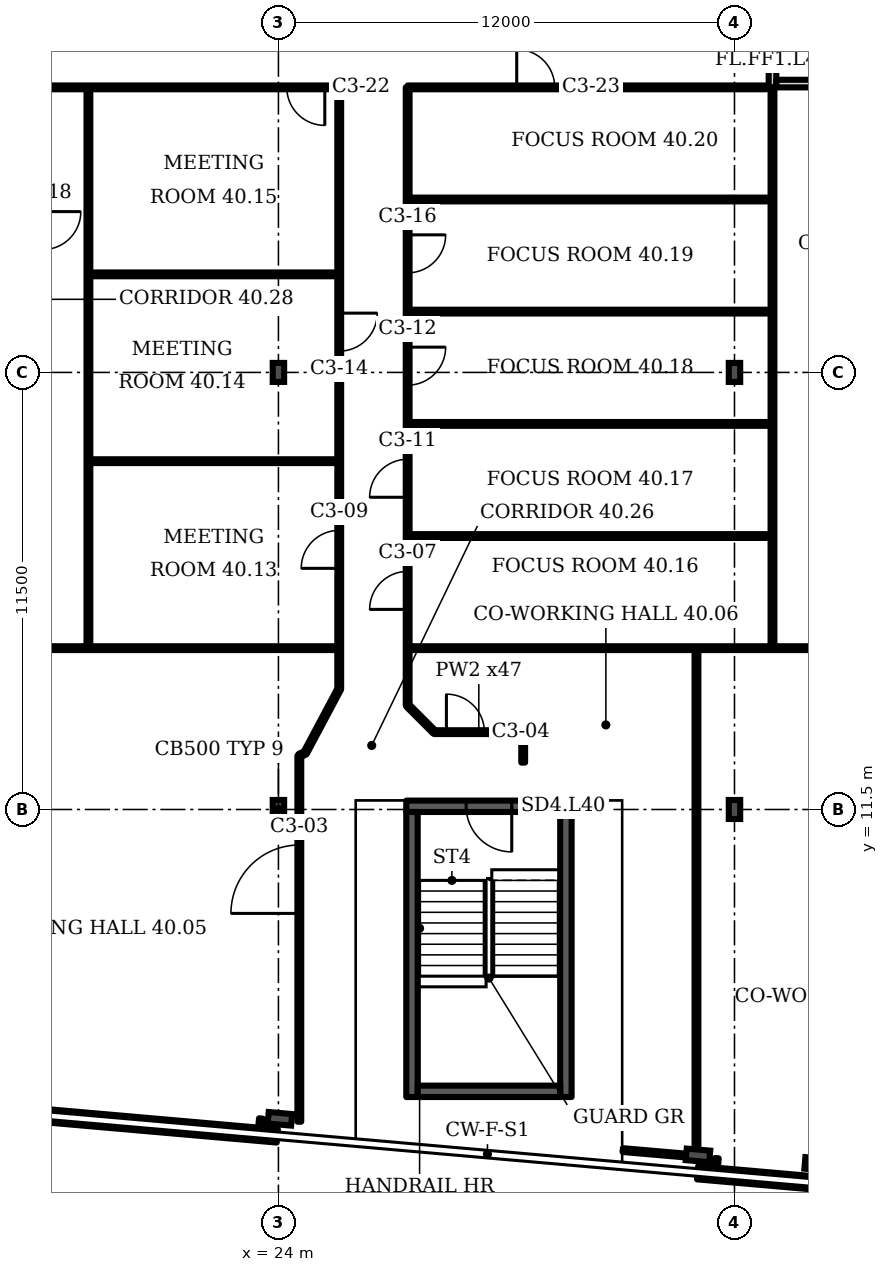
"""IFC4 building model, lengths in metres.
Left out: names, types, materials, properties, quantities, classifications, styles, units other than length and angle.
Written with IfcOpenShell. Run it as: python <this file> out.ifc"""

import sys

from ifc_helpers import new_model, si_unit, direction, frame, frame_2d, origin, origin_2d, place, context, subcontext, project, spatial, rectangle, i_section, extrude, element, fill, save


model = new_model("IFC4")
c1 = context("Model", 3, precision=1e-05, world=origin(), true_north=direction((0.0, 1.0)))
c2 = subcontext(c1, "Body", "Model", "MODEL_VIEW")
j1 = project(units=[si_unit("LENGTHUNIT", "METRE"), si_unit("PLANEANGLEUNIT", "RADIAN")], contexts=[c1])
p1 = place(None, origin())
s1 = spatial("IfcSite", under=j1, at=p1, CompositionType="ELEMENT")
p2 = place(p1, origin())
s2 = spatial("IfcBuilding", under=s1, at=p2, CompositionType="ELEMENT")
p3 = place(p2, frame((0.0, 0.0, 166.3)))
s3 = spatial("IfcBuildingStorey", under=s2, at=p3, CompositionType="ELEMENT", Elevation=166.3)
for number, where, z_axis, x_axis in (
    (1, (24.039, 3.361, 0.0), (0.0, 0.0, 1.0), (-0.087, -0.996, 0.0)),
    (2, (35.039, 2.399, 0.0), (0.0, 0.0, 1.0), (-0.087, -0.996, 0.0)),
    (3, (38.161, 2.174, 0.0), (0.0, 0.0, 1.0), (-0.087, -0.996, 0.0)),
):
    element("IfcColumn", number, at=place(p3, frame(where, z_axis=z_axis, x_axis=x_axis)), inside=s3, PredefinedType="COLUMN", context=c2, shape_type="SweptSolid", body=[
        extrude(i_section(OverallWidth=0.305, OverallDepth=0.62, WebThickness=0.021, FlangeThickness=0.04, FilletRadius=0.027, at=origin_2d()), origin(), (0.0, 0.0, 1.0), 3.6),
    ])
for number, where, z_axis, x_axis in (
    (4, (24.0, 11.5, 0.0), (0.0, 0.0, 1.0), (1.0, 0.0, 0.0)),
    (5, (36.0, 11.5, 0.0), (0.0, 0.0, 1.0), (1.0, 0.0, 0.0)),
    (6, (24.0, 23.0, 0.0), (0.0, 0.0, 1.0), (1.0, 0.0, 0.0)),
    (7, (36.0, 23.0, 0.0), (0.0, 0.0, 1.0), (1.0, 0.0, 0.0)),
):
    element("IfcColumn", number, at=place(p3, frame(where, z_axis=z_axis, x_axis=x_axis)), inside=s3, PredefinedType="COLUMN", context=c2, shape_type="SweptSolid", body=[
        extrude(i_section(OverallWidth=0.3, OverallDepth=0.5, WebThickness=0.014, FlangeThickness=0.028, FilletRadius=0.027, at=origin_2d()), origin(), (0.0, 0.0, 1.0), 3.6),
    ])
p4 = place(p3, frame((12.835, 3.885, 0.0), z_axis=(0.0, 0.0, 1.0), x_axis=(0.996199, -0.087154, 0.0)))
e8 = element("IfcWall", 8, at=p4, inside=s3, PredefinedType="SOLIDWALL", context=c2, shape_type="SweptSolid", body=[
    extrude(rectangle(XDim=11.177, YDim=0.35, at=frame_2d((5.588, 0.0))), origin(), (0.0, 0.0, 1.0), 1.0),
])
p5 = place(p3, frame((35.03, 1.943, 0.0), z_axis=(0.0, 0.0, 1.0), x_axis=(0.996199, -0.08714, 0.0)))
e9 = element("IfcWall", 9, at=p5, inside=s3, PredefinedType="SOLIDWALL", context=c2, shape_type="SweptSolid", body=[
    extrude(rectangle(XDim=11.028, YDim=0.35, at=frame_2d((5.514, 0.0))), origin(), (0.0, 0.0, 1.0), 1.0),
])
p6 = place(p3, frame((37.0, 30.5, 0.0), z_axis=(0.0, 0.0, 1.0), x_axis=(0.0, 1.0, 0.0)))
e10 = element("IfcWall", 10, at=p6, inside=s3, PredefinedType="PARTITIONING", context=c2, shape_type="SweptSolid", body=[
    extrude(rectangle(XDim=3.5, YDim=0.2, at=frame_2d((1.75, 0.0))), origin(), (0.0, 0.0, 1.0), 3.2),
])
p7 = place(p6, frame((1.2, 0.0, 0.0)))
e11 = element("IfcOpeningElement", 11, at=p7, cuts=e10, PredefinedType="OPENING", context=c2, shape_type="SweptSolid", body=[
    extrude(rectangle(XDim=1.1, YDim=2.1, at=frame_2d((0.55, 1.05))), frame((0.0, 0.11, 0.0), z_axis=(0.0, -1.0, 0.0), x_axis=(1.0, 0.0, 0.0)), (0.0, 0.0, 1.0), 0.22),
])
p8 = place(p3, frame((37.1, 30.6, 0.0), z_axis=(0.0, 0.0, 1.0), x_axis=(1.0, 0.0, 0.0)))
e12 = element("IfcWall", 12, at=p8, inside=s3, PredefinedType="PARTITIONING", context=c2, shape_type="SweptSolid", body=[
    extrude(rectangle(XDim=2.8, YDim=0.2, at=frame_2d((1.4, 0.0))), origin(), (0.0, 0.0, 1.0), 3.2),
])
p9 = place(p3, frame((27.364, 11.584, 0.0), z_axis=(0.0, 0.0, 1.0), x_axis=(1.0, 0.0, 0.0)))
e13 = element("IfcWall", 13, at=p9, inside=s3, PredefinedType="SHEAR", context=c2, shape_type="SweptSolid", body=[
    extrude(rectangle(XDim=4.35, YDim=0.3, at=frame_2d((2.175, 0.0))), origin(), (0.0, 0.0, 1.0), 3.2),
])
p10 = place(p9, frame((1.575, 0.0, 0.0)))
e14 = element("IfcOpeningElement", 14, at=p10, cuts=e13, PredefinedType="OPENING", context=c2, shape_type="SweptSolid", body=[
    extrude(rectangle(XDim=1.2, YDim=2.1, at=frame_2d((0.6, 1.05))), frame((0.0, 0.16, 0.0), z_axis=(0.0, -1.0, 0.0), x_axis=(1.0, 0.0, 0.0)), (0.0, 0.0, 1.0), 0.32),
])
p11 = place(p3, frame((13.0, 15.745, 0.0), z_axis=(0.0, 0.0, 1.0), x_axis=(1.0, 0.0, 0.0)))
e15 = element("IfcWall", 15, at=p11, inside=s3, PredefinedType="PARTITIONING", context=c2, shape_type="SweptSolid", body=[
    extrude(rectangle(XDim=12.6, YDim=0.1, at=frame_2d((6.3, 0.0))), origin(), (0.0, 0.0, 1.0), 3.2),
])
p12 = place(p3, frame((17.8, 30.5, 0.0), z_axis=(0.0, 0.0, 1.0), x_axis=(1.0, 0.0, 0.0)))
e16 = element("IfcWall", 16, at=p12, inside=s3, PredefinedType="PARTITIONING", context=c2, shape_type="SweptSolid", body=[
    extrude(rectangle(XDim=7.8, YDim=0.1, at=frame_2d((3.9, 0.0))), origin(), (0.0, 0.0, 1.0), 3.2),
])
p13 = place(p12, frame((6.42, 0.0, 0.0)))
e17 = element("IfcOpeningElement", 17, at=p13, cuts=e16, PredefinedType="OPENING", context=c2, shape_type="SweptSolid", body=[
    extrude(rectangle(XDim=1.0, YDim=2.1, at=frame_2d((0.5, 1.05))), frame((0.0, 0.06, 0.0), z_axis=(0.0, -1.0, 0.0), x_axis=(1.0, 0.0, 0.0)), (0.0, 0.0, 1.0), 0.12),
])
p14 = place(p3, frame((19.0, 15.745, 0.0), z_axis=(0.0, 0.0, 1.0), x_axis=(0.0, 1.0, 0.0)))
e18 = element("IfcWall", 18, at=p14, inside=s3, PredefinedType="PARTITIONING", context=c2, shape_type="SweptSolid", body=[
    extrude(rectangle(XDim=14.755, YDim=0.1, at=frame_2d((7.377, 0.0))), origin(), (0.0, 0.0, 1.0), 3.2),
])
for number, where, z_axis, x_axis in (
    (19, (19.0, 20.665, 0.0), (0.0, 0.0, 1.0), (1.0, 0.0, 0.0)),
    (20, (19.0, 25.58, 0.0), (0.0, 0.0, 1.0), (1.0, 0.0, 0.0)),
):
    element("IfcWall", number, at=place(p3, frame(where, z_axis=z_axis, x_axis=x_axis)), inside=s3, PredefinedType="PARTITIONING", context=c2, shape_type="SweptSolid", body=[
        extrude(rectangle(XDim=6.6, YDim=0.1, at=frame_2d((3.3, 0.0))), origin(), (0.0, 0.0, 1.0), 3.2),
    ])
p15 = place(p3, frame((23.502, 2.976, 0.0), z_axis=(0.0, 0.0, 1.0), x_axis=(0.095654, 0.995419, 0.0)))
e21 = element("IfcWall", 21, at=p15, inside=s3, PredefinedType="PARTITIONING", context=c2, shape_type="SweptSolid", body=[
    extrude(rectangle(XDim=0.396, YDim=0.1, at=frame_2d((0.198, 0.0))), origin(), (0.0, 0.0, 1.0), 3.2),
])
p16 = place(p3, frame((24.55, 12.915, 0.0), z_axis=(0.0, 0.0, 1.0), x_axis=(0.900306, 0.435266, 0.0)))
e22 = element("IfcWall", 22, at=p16, inside=s3, PredefinedType="PARTITIONING", context=c2, shape_type="SweptSolid", body=[
    extrude(rectangle(XDim=0.172, YDim=0.1, at=frame_2d((0.086, 0.0))), origin(), (0.0, 0.0, 1.0), 3.2),
])
p17 = place(p3, frame((24.55, 3.285, 0.0), z_axis=(0.0, 0.0, 1.0), x_axis=(0.0, 1.0, 0.0)))
e23 = element("IfcWall", 23, at=p17, inside=s3, PredefinedType="PARTITIONING", context=c2, shape_type="SweptSolid", body=[
    extrude(rectangle(XDim=9.63, YDim=0.1, at=frame_2d((4.815, 0.0))), origin(), (0.0, 0.0, 1.0), 3.2),
])
p18 = place(p17, frame((5.481, 0.0, 0.0)))
e24 = element("IfcOpeningElement", 24, at=p18, cuts=e23, PredefinedType="OPENING", context=c2, shape_type="SweptSolid", body=[
    extrude(rectangle(XDim=1.8, YDim=2.1, at=frame_2d((0.9, 1.05))), frame((0.0, 0.06, 0.0), z_axis=(0.0, -1.0, 0.0), x_axis=(1.0, 0.0, 0.0)), (0.0, 0.0, 1.0), 0.12),
])
p19 = place(p3, frame((24.705, 12.99, 0.0), z_axis=(0.0, 0.0, 1.0), x_axis=(0.4702, 0.882555, 0.0)))
e25 = element("IfcWall", 25, at=p19, inside=s3, PredefinedType="PARTITIONING", context=c2, shape_type="SweptSolid", body=[
    extrude(rectangle(XDim=1.904, YDim=0.1, at=frame_2d((0.952, 0.0))), origin(), (0.0, 0.0, 1.0), 3.2),
])
p20 = place(p3, frame((25.6, 14.67, 0.0), z_axis=(0.0, 0.0, 1.0), x_axis=(0.0, 1.0, 0.0)))
e26 = element("IfcWall", 26, at=p20, inside=s3, PredefinedType="PARTITIONING", context=c2, shape_type="SweptSolid", body=[
    extrude(rectangle(XDim=15.83, YDim=0.1, at=frame_2d((7.915, 0.0))), origin(), (0.0, 0.0, 1.0), 3.2),
])
p21 = place(p20, frame((3.175, 0.0, 0.0)))
e27 = element("IfcOpeningElement", 27, at=p21, cuts=e26, PredefinedType="OPENING", context=c2, shape_type="SweptSolid", body=[
    extrude(rectangle(XDim=1.0, YDim=2.1, at=frame_2d((0.5, 1.05))), frame((0.0, 0.06, 0.0), z_axis=(0.0, -1.0, 0.0), x_axis=(1.0, 0.0, 0.0)), (0.0, 0.0, 1.0), 0.12),
])
p22 = place(p20, frame((8.89, 0.0, 0.0)))
e28 = element("IfcOpeningElement", 28, at=p22, cuts=e26, PredefinedType="OPENING", context=c2, shape_type="SweptSolid", body=[
    extrude(rectangle(XDim=1.0, YDim=2.1, at=frame_2d((0.5, 1.05))), frame((0.0, 0.06, 0.0), z_axis=(0.0, -1.0, 0.0), x_axis=(1.0, 0.0, 0.0)), (0.0, 0.0, 1.0), 0.12),
])
p23 = place(p3, frame((27.4, 14.24, 0.0), z_axis=(0.0, 0.0, 1.0), x_axis=(0.0, 1.0, 0.0)))
e29 = element("IfcWall", 29, at=p23, inside=s3, PredefinedType="PARTITIONING", context=c2, shape_type="SweptSolid", body=[
    extrude(rectangle(XDim=16.26, YDim=0.1, at=frame_2d((8.13, 0.0))), origin(), (0.0, 0.0, 1.0), 3.2),
])
p24 = place(p23, frame((2.525, 0.0, 0.0)))
e30 = element("IfcOpeningElement", 30, at=p24, cuts=e29, PredefinedType="OPENING", context=c2, shape_type="SweptSolid", body=[
    extrude(rectangle(XDim=1.0, YDim=2.1, at=frame_2d((0.5, 1.05))), frame((0.0, 0.06, 0.0), z_axis=(0.0, -1.0, 0.0), x_axis=(1.0, 0.0, 0.0)), (0.0, 0.0, 1.0), 0.12),
])
p25 = place(p23, frame((5.475, 0.0, 0.0)))
e31 = element("IfcOpeningElement", 31, at=p25, cuts=e29, PredefinedType="OPENING", context=c2, shape_type="SweptSolid", body=[
    extrude(rectangle(XDim=1.0, YDim=2.1, at=frame_2d((0.5, 1.05))), frame((0.0, 0.06, 0.0), z_axis=(0.0, -1.0, 0.0), x_axis=(1.0, 0.0, 0.0)), (0.0, 0.0, 1.0), 0.12),
])
p26 = place(p23, frame((8.425, 0.0, 0.0)))
e32 = element("IfcOpeningElement", 32, at=p26, cuts=e29, PredefinedType="OPENING", context=c2, shape_type="SweptSolid", body=[
    extrude(rectangle(XDim=1.0, YDim=2.1, at=frame_2d((0.5, 1.05))), frame((0.0, 0.06, 0.0), z_axis=(0.0, -1.0, 0.0), x_axis=(1.0, 0.0, 0.0)), (0.0, 0.0, 1.0), 0.12),
])
p27 = place(p23, frame((11.38, 0.0, 0.0)))
e33 = element("IfcOpeningElement", 33, at=p27, cuts=e29, PredefinedType="OPENING", context=c2, shape_type="SweptSolid", body=[
    extrude(rectangle(XDim=1.0, YDim=2.1, at=frame_2d((0.5, 1.05))), frame((0.0, 0.06, 0.0), z_axis=(0.0, -1.0, 0.0), x_axis=(1.0, 0.0, 0.0)), (0.0, 0.0, 1.0), 0.12),
])
p28 = place(p3, frame((27.4, 15.745, 0.0), z_axis=(0.0, 0.0, 1.0), x_axis=(1.0, 0.0, 0.0)))
e34 = element("IfcWall", 34, at=p28, inside=s3, PredefinedType="PARTITIONING", context=c2, shape_type="SweptSolid", body=[
    extrude(rectangle(XDim=17.7, YDim=0.1, at=frame_2d((8.85, 0.0))), origin(), (0.0, 0.0, 1.0), 3.2),
])
for number, where, z_axis, x_axis in (
    (35, (27.4, 18.695, 0.0), (0.0, 0.0, 1.0), (1.0, 0.0, 0.0)),
    (36, (27.4, 21.645, 0.0), (0.0, 0.0, 1.0), (1.0, 0.0, 0.0)),
    (37, (27.4, 24.6, 0.0), (0.0, 0.0, 1.0), (1.0, 0.0, 0.0)),
    (38, (27.4, 27.55, 0.0), (0.0, 0.0, 1.0), (1.0, 0.0, 0.0)),
):
    element("IfcWall", number, at=place(p3, frame(where, z_axis=z_axis, x_axis=x_axis)), inside=s3, PredefinedType="PARTITIONING", context=c2, shape_type="SweptSolid", body=[
        extrude(rectangle(XDim=9.6, YDim=0.1, at=frame_2d((4.8, 0.0))), origin(), (0.0, 0.0, 1.0), 3.2),
    ])
p29 = place(p3, frame((27.4, 30.5, 0.0), z_axis=(0.0, 0.0, 1.0), x_axis=(1.0, 0.0, 0.0)))
e39 = element("IfcWall", 39, at=p29, inside=s3, PredefinedType="PARTITIONING", context=c2, shape_type="SweptSolid", body=[
    extrude(rectangle(XDim=9.45, YDim=0.1, at=frame_2d((4.725, 0.0))), origin(), (0.0, 0.0, 1.0), 3.2),
])
p30 = place(p29, frame((2.87, 0.0, 0.0)))
e40 = element("IfcOpeningElement", 40, at=p30, cuts=e39, PredefinedType="OPENING", context=c2, shape_type="SweptSolid", body=[
    extrude(rectangle(XDim=1.0, YDim=2.1, at=frame_2d((0.5, 1.05))), frame((0.0, 0.06, 0.0), z_axis=(0.0, -1.0, 0.0), x_axis=(1.0, 0.0, 0.0)), (0.0, 0.0, 1.0), 0.12),
])
p31 = place(p3, frame((28.105, 13.535, 0.0), z_axis=(0.0, 0.0, 1.0), x_axis=(-0.707107, 0.707107, 0.0)))
e41 = element("IfcWall", 41, at=p31, inside=s3, PredefinedType="PARTITIONING", context=c2, shape_type="SweptSolid", body=[
    extrude(rectangle(XDim=0.997, YDim=0.1, at=frame_2d((0.499, 0.0))), origin(), (0.0, 0.0, 1.0), 3.2),
])
p32 = place(p3, frame((28.105, 13.535, 0.0), z_axis=(0.0, 0.0, 1.0), x_axis=(1.0, 0.0, 0.0)))
e42 = element("IfcWall", 42, at=p32, inside=s3, PredefinedType="PARTITIONING", context=c2, shape_type="SweptSolid", body=[
    extrude(rectangle(XDim=2.335, YDim=0.1, at=frame_2d((1.167, 0.0))), origin(), (0.0, 0.0, 1.0), 3.2),
])
p33 = place(p32, frame((0.315, 0.0, 0.0)))
e43 = element("IfcOpeningElement", 43, at=p33, cuts=e42, PredefinedType="OPENING", context=c2, shape_type="SweptSolid", body=[
    extrude(rectangle(XDim=1.0, YDim=2.1, at=frame_2d((0.5, 1.05))), frame((0.0, 0.06, 0.0), z_axis=(0.0, -1.0, 0.0), x_axis=(1.0, 0.0, 0.0)), (0.0, 0.0, 1.0), 0.12),
])
p34 = place(p3, frame((30.44, 12.734, 0.0), z_axis=(0.0, 0.0, 1.0), x_axis=(0.0, 1.0, 0.0)))
e44 = element("IfcWall", 44, at=p34, inside=s3, PredefinedType="PARTITIONING", context=c2, shape_type="SweptSolid", body=[
    extrude(rectangle(XDim=0.801, YDim=0.1, at=frame_2d((0.4, 0.0))), origin(), (0.0, 0.0, 1.0), 3.2),
])
p35 = place(p3, frame((35.0, 2.37, 0.0), z_axis=(0.0, 0.0, 1.0), x_axis=(-0.996265, 0.086343, 0.0)))
e45 = element("IfcWall", 45, at=p35, inside=s3, PredefinedType="PARTITIONING", context=c2, shape_type="SweptSolid", body=[
    extrude(rectangle(XDim=1.948, YDim=0.1, at=frame_2d((0.974, 0.0))), origin(), (0.0, 0.0, 1.0), 2.58),
])
p36 = place(p3, frame((35.0, 2.37, 0.0), z_axis=(0.0, 0.0, 1.0), x_axis=(0.0, 1.0, 0.0)))
e46 = element("IfcWall", 46, at=p36, inside=s3, PredefinedType="PARTITIONING", context=c2, shape_type="SweptSolid", body=[
    extrude(rectangle(XDim=13.375, YDim=0.1, at=frame_2d((6.688, 0.0))), origin(), (0.0, 0.0, 1.0), 3.2),
])
p37 = place(p3, frame((35.502, 1.927, 0.0), z_axis=(0.0, 0.0, 1.0), x_axis=(0.083045, 0.996542, 0.0)))
e47 = element("IfcWall", 47, at=p37, inside=s3, PredefinedType="PARTITIONING", context=c2, shape_type="SweptSolid", body=[
    extrude(rectangle(XDim=0.4, YDim=0.1, at=frame_2d((0.2, 0.0))), origin(), (0.0, 0.0, 1.0), 3.2),
])
p38 = place(p3, frame((37.0, 15.745, 0.0), z_axis=(0.0, 0.0, 1.0), x_axis=(0.0, 1.0, 0.0)))
e48 = element("IfcWall", 48, at=p38, inside=s3, PredefinedType="PARTITIONING", context=c2, shape_type="SweptSolid", body=[
    extrude(rectangle(XDim=14.755, YDim=0.1, at=frame_2d((7.377, 0.0))), origin(), (0.0, 0.0, 1.0), 3.2),
])
for number, where, z_axis, x_axis in (
    (49, (27.514, 3.934, 0.0), (0.0, 0.0, 1.0), (0.0, 1.0, 0.0)),
    (50, (31.564, 3.934, 0.0), (0.0, 0.0, 1.0), (0.0, 1.0, 0.0)),
):
    element("IfcWall", number, at=place(p3, frame(where, z_axis=z_axis, x_axis=x_axis)), inside=s3, PredefinedType="SHEAR", context=c2, shape_type="SweptSolid", body=[
        extrude(rectangle(XDim=7.5, YDim=0.3, at=frame_2d((3.75, 0.0))), origin(), (0.0, 0.0, 1.0), 3.2),
    ])
p39 = place(p3, frame((27.664, 4.084, 0.0), z_axis=(0.0, 0.0, 1.0), x_axis=(1.0, 0.0, 0.0)))
e51 = element("IfcWall", 51, at=p39, inside=s3, PredefinedType="SHEAR", context=c2, shape_type="SweptSolid", body=[
    extrude(rectangle(XDim=3.75, YDim=0.3, at=frame_2d((1.875, 0.0))), origin(), (0.0, 0.0, 1.0), 3.2),
])
p40 = place(p10, origin())
e52 = element("IfcDoor", 52, at=p40, inside=s3, OperationType="SINGLE_SWING_RIGHT", PredefinedType="DOOR", context=c2, shape_type="SweptSolid", body=[
    extrude(rectangle(XDim=1.2, YDim=2.1, at=frame_2d((0.6, 1.05))), frame((0.0, 0.025, 0.0), z_axis=(0.0, -1.0, 0.0), x_axis=(1.0, 0.0, 0.0)), (0.0, 0.0, 1.0), 0.05),
])
fill(e14, e52)
p41 = place(p18, origin())
e53 = element("IfcDoor", 53, at=p41, inside=s3, OperationType="DOUBLE_DOOR_SINGLE_SWING", PredefinedType="DOOR", context=c2, shape_type="SweptSolid", body=[
    extrude(rectangle(XDim=1.8, YDim=2.1, at=frame_2d((0.9, 1.05))), frame((0.0, 0.025, 0.0), z_axis=(0.0, -1.0, 0.0), x_axis=(1.0, 0.0, 0.0)), (0.0, 0.0, 1.0), 0.05),
])
fill(e24, e53)
p42 = place(p33, origin())
e54 = element("IfcDoor", 54, at=p42, inside=s3, OperationType="SINGLE_SWING_LEFT", PredefinedType="DOOR", context=c2, shape_type="SweptSolid", body=[
    extrude(rectangle(XDim=1.0, YDim=2.1, at=frame_2d((0.5, 1.05))), frame((0.0, 0.025, 0.0), z_axis=(0.0, -1.0, 0.0), x_axis=(1.0, 0.0, 0.0)), (0.0, 0.0, 1.0), 0.05),
])
fill(e43, e54)
p43 = place(p24, origin())
e55 = element("IfcDoor", 55, at=p43, inside=s3, OperationType="SINGLE_SWING_LEFT", PredefinedType="DOOR", context=c2, shape_type="SweptSolid", body=[
    extrude(rectangle(XDim=1.0, YDim=2.1, at=frame_2d((0.5, 1.05))), frame((0.0, 0.025, 0.0), z_axis=(0.0, -1.0, 0.0), x_axis=(1.0, 0.0, 0.0)), (0.0, 0.0, 1.0), 0.05),
])
fill(e30, e55)
p44 = place(p21, origin())
e56 = element("IfcDoor", 56, at=p44, inside=s3, OperationType="SINGLE_SWING_LEFT", PredefinedType="DOOR", context=c2, shape_type="SweptSolid", body=[
    extrude(rectangle(XDim=1.0, YDim=2.1, at=frame_2d((0.5, 1.05))), frame((0.0, 0.025, 0.0), z_axis=(0.0, -1.0, 0.0), x_axis=(1.0, 0.0, 0.0)), (0.0, 0.0, 1.0), 0.05),
])
fill(e27, e56)
p45 = place(p25, origin())
e57 = element("IfcDoor", 57, at=p45, inside=s3, OperationType="SINGLE_SWING_LEFT", PredefinedType="DOOR", context=c2, shape_type="SweptSolid", body=[
    extrude(rectangle(XDim=1.0, YDim=2.1, at=frame_2d((0.5, 1.05))), frame((0.0, 0.025, 0.0), z_axis=(0.0, -1.0, 0.0), x_axis=(1.0, 0.0, 0.0)), (0.0, 0.0, 1.0), 0.05),
])
fill(e31, e57)
p46 = place(p26, origin())
e58 = element("IfcDoor", 58, at=p46, inside=s3, OperationType="SINGLE_SWING_RIGHT", PredefinedType="DOOR", context=c2, shape_type="SweptSolid", body=[
    extrude(rectangle(XDim=1.0, YDim=2.1, at=frame_2d((0.5, 1.05))), frame((0.0, 0.025, 0.0), z_axis=(0.0, -1.0, 0.0), x_axis=(1.0, 0.0, 0.0)), (0.0, 0.0, 1.0), 0.05),
])
fill(e32, e58)
p47 = place(p22, origin())
e59 = element("IfcDoor", 59, at=p47, inside=s3, OperationType="SINGLE_SWING_RIGHT", PredefinedType="DOOR", context=c2, shape_type="SweptSolid", body=[
    extrude(rectangle(XDim=1.0, YDim=2.1, at=frame_2d((0.5, 1.05))), frame((0.0, 0.025, 0.0), z_axis=(0.0, -1.0, 0.0), x_axis=(1.0, 0.0, 0.0)), (0.0, 0.0, 1.0), 0.05),
])
fill(e28, e59)
p48 = place(p27, origin())
e60 = element("IfcDoor", 60, at=p48, inside=s3, OperationType="SINGLE_SWING_RIGHT", PredefinedType="DOOR", context=c2, shape_type="SweptSolid", body=[
    extrude(rectangle(XDim=1.0, YDim=2.1, at=frame_2d((0.5, 1.05))), frame((0.0, 0.025, 0.0), z_axis=(0.0, -1.0, 0.0), x_axis=(1.0, 0.0, 0.0)), (0.0, 0.0, 1.0), 0.05),
])
fill(e33, e60)
p49 = place(p13, origin())
e61 = element("IfcDoor", 61, at=p49, inside=s3, OperationType="SINGLE_SWING_RIGHT", PredefinedType="DOOR", context=c2, shape_type="SweptSolid", body=[
    extrude(rectangle(XDim=1.0, YDim=2.1, at=frame_2d((0.5, 1.05))), frame((0.0, 0.025, 0.0), z_axis=(0.0, -1.0, 0.0), x_axis=(1.0, 0.0, 0.0)), (0.0, 0.0, 1.0), 0.05),
])
fill(e17, e61)
p50 = place(p30, origin())
e62 = element("IfcDoor", 62, at=p50, inside=s3, OperationType="SINGLE_SWING_LEFT", PredefinedType="DOOR", context=c2, shape_type="SweptSolid", body=[
    extrude(rectangle(XDim=1.0, YDim=2.1, at=frame_2d((0.5, 1.05))), frame((0.0, 0.025, 0.0), z_axis=(0.0, -1.0, 0.0), x_axis=(1.0, 0.0, 0.0)), (0.0, 0.0, 1.0), 0.05),
])
fill(e40, e62)
save(model, sys.argv[1])
